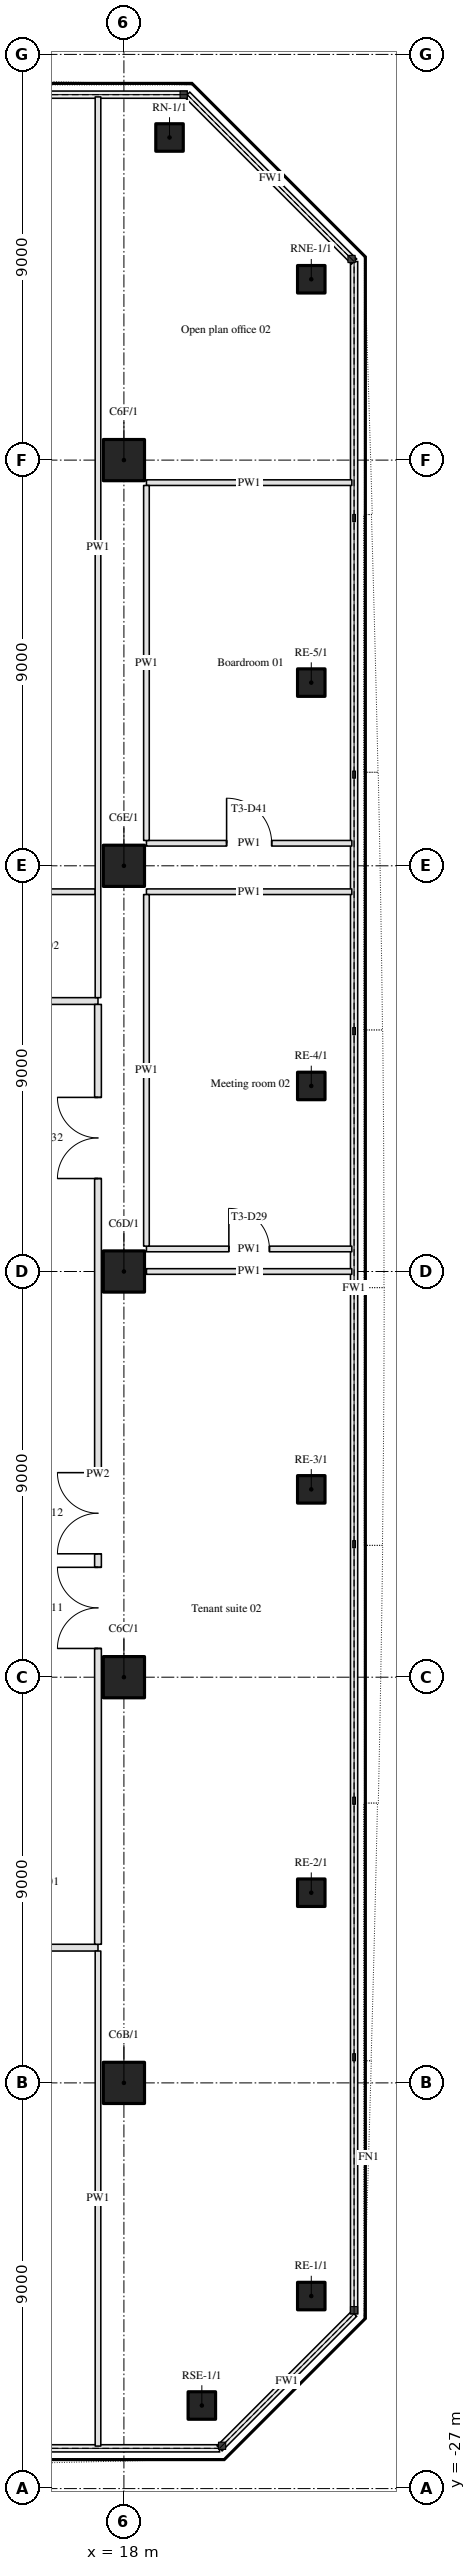
"""IFC4 building model, lengths in metres.
Left out: names, types, materials, properties, quantities, classifications, styles, units other than length and angle.
Written with IfcOpenShell. Run it as: python <this file> out.ifc"""

import sys

from ifc_helpers import new_model, si_unit, direction, frame, frame_2d, origin, origin_2d, place, context, subcontext, project, spatial, rectangle, hollow_circle, extrude, element, fill, save


model = new_model("IFC4")
c1 = context("Model", 3, precision=1e-05, world=origin(), true_north=direction((0.0, 1.0)))
c2 = subcontext(c1, "Body", "Model", "MODEL_VIEW")
j1 = project(units=[si_unit("LENGTHUNIT", "METRE"), si_unit("PLANEANGLEUNIT", "RADIAN")], contexts=[c1])
p1 = place(None, origin())
s1 = spatial("IfcSite", under=j1, at=p1, CompositionType="ELEMENT")
p2 = place(p1, origin())
s2 = spatial("IfcBuilding", under=s1, at=p2, CompositionType="ELEMENT")
p3 = place(p2, frame((0.0, 0.0, 53.7)))
s3 = spatial("IfcBuildingStorey", under=s2, at=p3, CompositionType="ELEMENT", Elevation=53.7)
for number, where, z_axis, x_axis in (
    (1, (18.0, -18.0, 0.0), (0.0, 0.0, 1.0), (1.0, 0.0, 0.0)),
    (2, (18.0, -9.0, 0.0), (0.0, 0.0, 1.0), (1.0, 0.0, 0.0)),
    (3, (18.0, 0.0, 0.0), (0.0, 0.0, 1.0), (1.0, 0.0, 0.0)),
    (4, (18.0, 9.0, 0.0), (0.0, 0.0, 1.0), (1.0, 0.0, 0.0)),
    (5, (18.0, 18.0, 0.0), (0.0, 0.0, 1.0), (1.0, 0.0, 0.0)),
):
    element("IfcColumn", number, at=place(p3, frame(where, z_axis=z_axis, x_axis=x_axis)), inside=s3, PredefinedType="COLUMN", context=c2, shape_type="SweptSolid", body=[
        extrude(hollow_circle(Radius=0.457, WallThickness=0.05, at=origin_2d()), origin(), (0.0, 0.0, 1.0), 3.9),
    ])
for number, where, z_axis, x_axis in (
    (6, (19.729, -25.157, 0.0), (0.0, 0.0, 1.0), (1.0, 0.0, 0.0)),
    (7, (22.157, -22.729, 0.0), (0.0, 0.0, 1.0), (1.0, 0.0, 0.0)),
    (8, (22.157, -13.781, 0.0), (0.0, 0.0, 1.0), (1.0, 0.0, 0.0)),
    (9, (22.157, -4.833, 0.0), (0.0, 0.0, 1.0), (1.0, 0.0, 0.0)),
    (10, (22.157, 4.116, 0.0), (0.0, 0.0, 1.0), (1.0, 0.0, 0.0)),
    (11, (22.157, 13.064, 0.0), (0.0, 0.0, 1.0), (1.0, 0.0, 0.0)),
    (12, (22.157, 22.012, 0.0), (0.0, 0.0, 1.0), (1.0, 0.0, 0.0)),
    (13, (19.012, 25.157, 0.0), (0.0, 0.0, 1.0), (1.0, 0.0, 0.0)),
):
    element("IfcColumn", number, at=place(p3, frame(where, z_axis=z_axis, x_axis=x_axis)), inside=s3, PredefinedType="COLUMN", context=c2, shape_type="SweptSolid", body=[
        extrude(hollow_circle(Radius=0.305, WallThickness=0.03, at=origin_2d()), origin(), (0.0, 0.0, 1.0), 3.9),
    ])
p4 = place(p3, frame((-17.425, -15.0, 0.0), z_axis=(0.0, 0.0, 1.0), x_axis=(1.0, 0.0, 0.0)))
e14 = element("IfcWall", 14, at=p4, inside=s3, PredefinedType="PARTITIONING", context=c2, shape_type="SweptSolid", body=[
    extrude(rectangle(XDim=34.85, YDim=0.15, at=frame_2d((17.425, 0.0))), origin(), (0.0, 0.0, 1.0), 2.96),
])
p5 = place(p4, frame((25.238, 0.0, 0.0)))
e15 = element("IfcOpeningElement", 15, at=p5, cuts=e14, PredefinedType="OPENING", context=c2, shape_type="SweptSolid", body=[
    extrude(rectangle(XDim=1.8, YDim=2.1, at=frame_2d((0.9, 1.05))), frame((0.0, 0.085, 0.0), z_axis=(0.0, -1.0, 0.0), x_axis=(1.0, 0.0, 0.0)), (0.0, 0.0, 1.0), 0.17),
])
p6 = place(p4, frame((23.137, 0.0, 0.0)))
e16 = element("IfcOpeningElement", 16, at=p6, cuts=e14, PredefinedType="OPENING", context=c2, shape_type="SweptSolid", body=[
    extrude(rectangle(XDim=1.8, YDim=2.1, at=frame_2d((0.9, 1.05))), frame((0.0, 0.085, 0.0), z_axis=(0.0, -1.0, 0.0), x_axis=(1.0, 0.0, 0.0)), (0.0, 0.0, 1.0), 0.17),
])
p7 = place(p3, frame((18.5, 0.0, 0.0), z_axis=(0.0, 0.0, 1.0), x_axis=(1.0, 0.0, 0.0)))
e17 = element("IfcWall", 17, at=p7, inside=s3, PredefinedType="PARTITIONING", context=c2, shape_type="SweptSolid", body=[
    extrude(rectangle(XDim=4.557, YDim=0.125, at=frame_2d((2.278, 0.0))), origin(), (0.0, 0.0, 1.0), 2.96),
])
p8 = place(p3, frame((18.5, 0.5, 0.0), z_axis=(0.0, 0.0, 1.0), x_axis=(1.0, 0.0, 0.0)))
e18 = element("IfcWall", 18, at=p8, inside=s3, PredefinedType="PARTITIONING", context=c2, shape_type="SweptSolid", body=[
    extrude(rectangle(XDim=4.557, YDim=0.125, at=frame_2d((2.278, 0.0))), origin(), (0.0, 0.0, 1.0), 2.96),
])
p9 = place(p8, frame((1.829, 0.0, 0.0)))
e19 = element("IfcOpeningElement", 19, at=p9, cuts=e18, PredefinedType="OPENING", context=c2, shape_type="SweptSolid", body=[
    extrude(rectangle(XDim=0.9, YDim=2.1, at=frame_2d((0.45, 1.05))), frame((0.0, 0.073, 0.0), z_axis=(0.0, -1.0, 0.0), x_axis=(1.0, 0.0, 0.0)), (0.0, 0.0, 1.0), 0.145),
])
p10 = place(p3, frame((-0.55, 6.0, 0.0), z_axis=(0.0, 0.0, 1.0), x_axis=(1.0, 0.0, 0.0)))
e20 = element("IfcWall", 20, at=p10, inside=s3, PredefinedType="PARTITIONING", context=c2, shape_type="SweptSolid", body=[
    extrude(rectangle(XDim=17.975, YDim=0.15, at=frame_2d((8.988, 0.0))), origin(), (0.0, 0.0, 1.0), 2.96),
])
p11 = place(p10, frame((1.525, 0.0, 0.0)))
e21 = element("IfcOpeningElement", 21, at=p11, cuts=e20, PredefinedType="OPENING", context=c2, shape_type="SweptSolid", body=[
    extrude(rectangle(XDim=0.9, YDim=2.1, at=frame_2d((0.45, 1.05))), frame((0.0, 0.085, 0.0), z_axis=(0.0, -1.0, 0.0), x_axis=(1.0, 0.0, 0.0)), (0.0, 0.0, 1.0), 0.17),
])
p12 = place(p10, frame((5.8, 0.0, 0.0)))
e22 = element("IfcOpeningElement", 22, at=p12, cuts=e20, PredefinedType="OPENING", context=c2, shape_type="SweptSolid", body=[
    extrude(rectangle(XDim=0.9, YDim=2.1, at=frame_2d((0.45, 1.05))), frame((0.0, 0.085, 0.0), z_axis=(0.0, -1.0, 0.0), x_axis=(1.0, 0.0, 0.0)), (0.0, 0.0, 1.0), 0.17),
])
p13 = place(p10, frame((9.55, 0.0, 0.0)))
e23 = element("IfcOpeningElement", 23, at=p13, cuts=e20, PredefinedType="OPENING", context=c2, shape_type="SweptSolid", body=[
    extrude(rectangle(XDim=1.0, YDim=2.1, at=frame_2d((0.5, 1.05))), frame((0.0, 0.085, 0.0), z_axis=(0.0, -1.0, 0.0), x_axis=(1.0, 0.0, 0.0)), (0.0, 0.0, 1.0), 0.17),
])
p14 = place(p10, frame((12.6, 0.0, 0.0)))
e24 = element("IfcOpeningElement", 24, at=p14, cuts=e20, PredefinedType="OPENING", context=c2, shape_type="SweptSolid", body=[
    extrude(rectangle(XDim=0.9, YDim=2.1, at=frame_2d((0.45, 1.05))), frame((0.0, 0.085, 0.0), z_axis=(0.0, -1.0, 0.0), x_axis=(1.0, 0.0, 0.0)), (0.0, 0.0, 1.0), 0.17),
])
p15 = place(p10, frame((15.812, 0.0, 0.0)))
e25 = element("IfcOpeningElement", 25, at=p15, cuts=e20, PredefinedType="OPENING", context=c2, shape_type="SweptSolid", body=[
    extrude(rectangle(XDim=0.9, YDim=2.1, at=frame_2d((0.45, 1.05))), frame((0.0, 0.085, 0.0), z_axis=(0.0, -1.0, 0.0), x_axis=(1.0, 0.0, 0.0)), (0.0, 0.0, 1.0), 0.17),
])
p16 = place(p3, frame((11.075, 8.425, 0.0), z_axis=(0.0, 0.0, 1.0), x_axis=(1.0, 0.0, 0.0)))
e26 = element("IfcWall", 26, at=p16, inside=s3, PredefinedType="PARTITIONING", context=c2, shape_type="SweptSolid", body=[
    extrude(rectangle(XDim=6.288, YDim=0.125, at=frame_2d((3.144, 0.0))), origin(), (0.0, 0.0, 1.0), 2.96),
])
p17 = place(p3, frame((18.5, 8.425, 0.0), z_axis=(0.0, 0.0, 1.0), x_axis=(1.0, 0.0, 0.0)))
e27 = element("IfcWall", 27, at=p17, inside=s3, PredefinedType="PARTITIONING", context=c2, shape_type="SweptSolid", body=[
    extrude(rectangle(XDim=4.557, YDim=0.125, at=frame_2d((2.278, 0.0))), origin(), (0.0, 0.0, 1.0), 2.96),
])
p18 = place(p3, frame((18.5, 9.5, 0.0), z_axis=(0.0, 0.0, 1.0), x_axis=(1.0, 0.0, 0.0)))
e28 = element("IfcWall", 28, at=p18, inside=s3, PredefinedType="PARTITIONING", context=c2, shape_type="SweptSolid", body=[
    extrude(rectangle(XDim=4.557, YDim=0.125, at=frame_2d((2.278, 0.0))), origin(), (0.0, 0.0, 1.0), 2.96),
])
p19 = place(p18, frame((1.779, 0.0, 0.0)))
e29 = element("IfcOpeningElement", 29, at=p19, cuts=e28, PredefinedType="OPENING", context=c2, shape_type="SweptSolid", body=[
    extrude(rectangle(XDim=1.0, YDim=2.1, at=frame_2d((0.5, 1.05))), frame((0.0, 0.073, 0.0), z_axis=(0.0, -1.0, 0.0), x_axis=(1.0, 0.0, 0.0)), (0.0, 0.0, 1.0), 0.145),
])
p20 = place(p3, frame((18.5, 17.5, 0.0), z_axis=(0.0, 0.0, 1.0), x_axis=(1.0, 0.0, 0.0)))
e30 = element("IfcWall", 30, at=p20, inside=s3, PredefinedType="PARTITIONING", context=c2, shape_type="SweptSolid", body=[
    extrude(rectangle(XDim=4.557, YDim=0.125, at=frame_2d((2.278, 0.0))), origin(), (0.0, 0.0, 1.0), 2.96),
])
p21 = place(p3, frame((17.425, -26.057, 0.0), z_axis=(0.0, 0.0, 1.0), x_axis=(0.0, 1.0, 0.0)))
e31 = element("IfcWall", 31, at=p21, inside=s3, PredefinedType="PARTITIONING", context=c2, shape_type="SweptSolid", body=[
    extrude(rectangle(XDim=10.982, YDim=0.125, at=frame_2d((5.491, 0.0))), origin(), (0.0, 0.0, 1.0), 2.96),
])
p22 = place(p3, frame((17.425, -14.925, 0.0), z_axis=(0.0, 0.0, 1.0), x_axis=(0.0, 1.0, 0.0)))
e32 = element("IfcWall", 32, at=p22, inside=s3, PredefinedType="PARTITIONING", context=c2, shape_type="SweptSolid", body=[
    extrude(rectangle(XDim=20.85, YDim=0.15, at=frame_2d((10.425, 0.0))), origin(), (0.0, 0.0, 1.0), 2.96),
])
p23 = place(p22, frame((6.562, 0.0, 0.0)))
e33 = element("IfcOpeningElement", 33, at=p23, cuts=e32, PredefinedType="OPENING", context=c2, shape_type="SweptSolid", body=[
    extrude(rectangle(XDim=1.8, YDim=2.1, at=frame_2d((0.9, 1.05))), frame((0.0, 0.085, 0.0), z_axis=(0.0, -1.0, 0.0), x_axis=(1.0, 0.0, 0.0)), (0.0, 0.0, 1.0), 0.17),
])
p24 = place(p22, frame((8.663, 0.0, 0.0)))
e34 = element("IfcOpeningElement", 34, at=p24, cuts=e32, PredefinedType="OPENING", context=c2, shape_type="SweptSolid", body=[
    extrude(rectangle(XDim=1.8, YDim=2.1, at=frame_2d((0.9, 1.05))), frame((0.0, 0.085, 0.0), z_axis=(0.0, -1.0, 0.0), x_axis=(1.0, 0.0, 0.0)), (0.0, 0.0, 1.0), 0.17),
])
p25 = place(p22, frame((16.988, 0.0, 0.0)))
e35 = element("IfcOpeningElement", 35, at=p25, cuts=e32, PredefinedType="OPENING", context=c2, shape_type="SweptSolid", body=[
    extrude(rectangle(XDim=1.8, YDim=2.1, at=frame_2d((0.9, 1.05))), frame((0.0, 0.085, 0.0), z_axis=(0.0, -1.0, 0.0), x_axis=(1.0, 0.0, 0.0)), (0.0, 0.0, 1.0), 0.17),
])
p26 = place(p3, frame((17.425, 6.075, 0.0), z_axis=(0.0, 0.0, 1.0), x_axis=(0.0, 1.0, 0.0)))
e36 = element("IfcWall", 36, at=p26, inside=s3, PredefinedType="PARTITIONING", context=c2, shape_type="SweptSolid", body=[
    extrude(rectangle(XDim=19.982, YDim=0.125, at=frame_2d((9.991, 0.0))), origin(), (0.0, 0.0, 1.0), 2.96),
])
p27 = place(p3, frame((18.5, 0.562, 0.0), z_axis=(0.0, 0.0, 1.0), x_axis=(0.0, 1.0, 0.0)))
e37 = element("IfcWall", 37, at=p27, inside=s3, PredefinedType="PARTITIONING", context=c2, shape_type="SweptSolid", body=[
    extrude(rectangle(XDim=7.8, YDim=0.125, at=frame_2d((3.9, 0.0))), origin(), (0.0, 0.0, 1.0), 2.96),
])
p28 = place(p3, frame((18.5, 9.562, 0.0), z_axis=(0.0, 0.0, 1.0), x_axis=(0.0, 1.0, 0.0)))
e38 = element("IfcWall", 38, at=p28, inside=s3, PredefinedType="PARTITIONING", context=c2, shape_type="SweptSolid", body=[
    extrude(rectangle(XDim=7.875, YDim=0.125, at=frame_2d((3.938, 0.0))), origin(), (0.0, 0.0, 1.0), 2.96),
])
p29 = place(p23, origin())
e39 = element("IfcDoor", 39, at=p29, inside=s3, OperationType="DOUBLE_DOOR_SINGLE_SWING", PredefinedType="DOOR", context=c2, shape_type="SweptSolid", body=[
    extrude(rectangle(XDim=1.8, YDim=2.1, at=frame_2d((0.9, 1.05))), frame((0.0, 0.025, 0.0), z_axis=(0.0, -1.0, 0.0), x_axis=(1.0, 0.0, 0.0)), (0.0, 0.0, 1.0), 0.05),
])
fill(e33, e39)
p30 = place(p24, origin())
e40 = element("IfcDoor", 40, at=p30, inside=s3, OperationType="DOUBLE_DOOR_SINGLE_SWING", PredefinedType="DOOR", context=c2, shape_type="SweptSolid", body=[
    extrude(rectangle(XDim=1.8, YDim=2.1, at=frame_2d((0.9, 1.05))), frame((0.0, 0.025, 0.0), z_axis=(0.0, -1.0, 0.0), x_axis=(1.0, 0.0, 0.0)), (0.0, 0.0, 1.0), 0.05),
])
fill(e34, e40)
p31 = place(p25, origin())
e41 = element("IfcDoor", 41, at=p31, inside=s3, OperationType="DOUBLE_DOOR_SINGLE_SWING", PredefinedType="DOOR", context=c2, shape_type="SweptSolid", body=[
    extrude(rectangle(XDim=1.8, YDim=2.1, at=frame_2d((0.9, 1.05))), frame((0.0, 0.025, 0.0), z_axis=(0.0, -1.0, 0.0), x_axis=(1.0, 0.0, 0.0)), (0.0, 0.0, 1.0), 0.05),
])
fill(e35, e41)
p32 = place(p19, origin())
e42 = element("IfcDoor", 42, at=p32, inside=s3, OperationType="SINGLE_SWING_LEFT", PredefinedType="DOOR", context=c2, shape_type="SweptSolid", body=[
    extrude(rectangle(XDim=1.0, YDim=2.1, at=frame_2d((0.5, 1.05))), frame((0.0, 0.025, 0.0), z_axis=(0.0, -1.0, 0.0), x_axis=(1.0, 0.0, 0.0)), (0.0, 0.0, 1.0), 0.05),
])
fill(e29, e42)
p33 = place(p9, origin())
e43 = element("IfcDoor", 43, at=p33, inside=s3, OperationType="SINGLE_SWING_LEFT", PredefinedType="DOOR", context=c2, shape_type="SweptSolid", body=[
    extrude(rectangle(XDim=0.9, YDim=2.1, at=frame_2d((0.45, 1.05))), frame((0.0, 0.025, 0.0), z_axis=(0.0, -1.0, 0.0), x_axis=(1.0, 0.0, 0.0)), (0.0, 0.0, 1.0), 0.05),
])
fill(e19, e43)
save(model, sys.argv[1])
